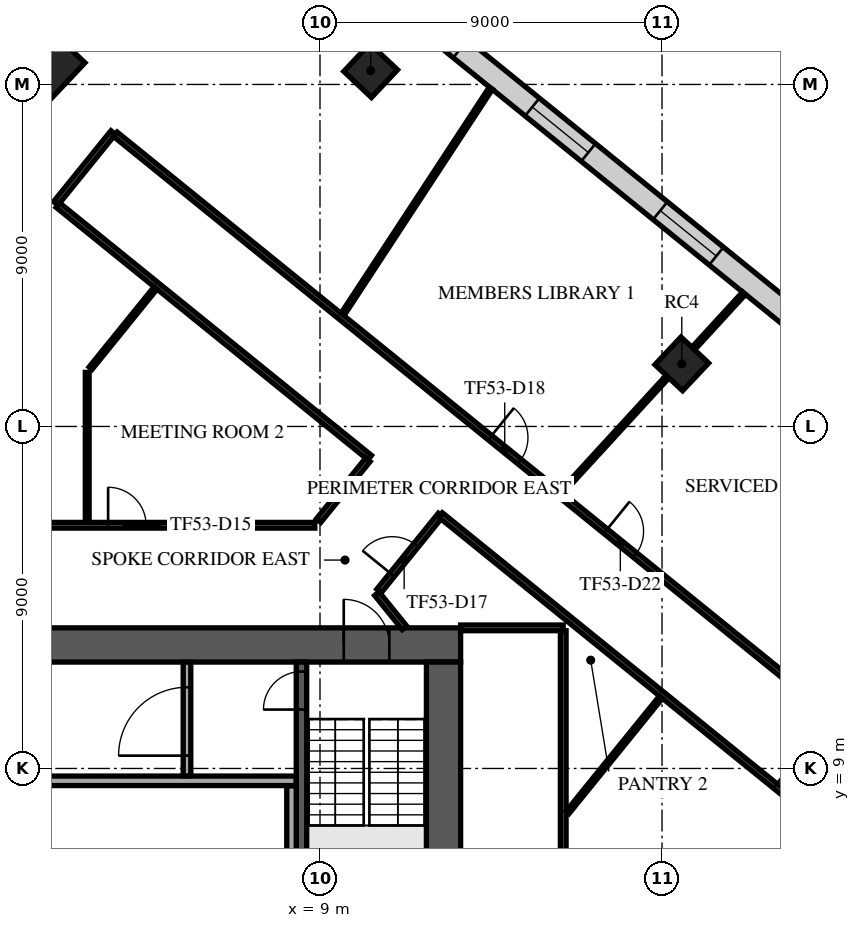
"""IFC4 building model, lengths in metres.
Left out: names, types, materials, properties, quantities, classifications, styles, units other than length and angle.
Written with IfcOpenShell. Run it as: python <this file> out.ifc"""

import sys

from ifc_helpers import new_model, si_unit, direction, frame, frame_2d, origin, origin_2d, place, context, subcontext, project, spatial, rectangle, extrude, element, fill, save


model = new_model("IFC4")
c1 = context("Model", 3, precision=1e-05, world=origin(), true_north=direction((0.0, 1.0)))
c2 = subcontext(c1, "Body", "Model", "MODEL_VIEW")
j1 = project(units=[si_unit("LENGTHUNIT", "METRE"), si_unit("PLANEANGLEUNIT", "RADIAN")], contexts=[c1])
p1 = place(None, origin())
s1 = spatial("IfcSite", under=j1, at=p1, CompositionType="ELEMENT")
p2 = place(p1, origin())
s2 = spatial("IfcBuilding", under=s1, at=p2, CompositionType="ELEMENT")
p3 = place(p2, frame((0.0, 0.0, 225.3)))
s3 = spatial("IfcBuildingStorey", under=s2, at=p3, CompositionType="ELEMENT", Elevation=225.3)
p4 = place(p3, frame((1.685, 27.538, 0.0), z_axis=(0.0, 0.0, 1.0), x_axis=(0.685916152371, 0.727680583715, 0.0)))
e1 = element("IfcColumn", 1, at=p4, inside=s3, PredefinedType="COLUMN", context=c2, shape_type="SweptSolid", body=[
    extrude(rectangle(XDim=1.6, YDim=1.6, at=origin_2d()), origin(), (0.0, 0.0, 1.0), 4.0),
])
for number, where, z_axis, x_axis in (
    (2, (18.52, 19.647, 0.0), (0.0, 0.0, 1.0), (0.686, 0.728, 0.0)),
    (3, (10.333, 27.364, 0.0), (0.0, 0.0, 1.0), (0.686, 0.728, 0.0)),
):
    element("IfcColumn", number, at=place(p3, frame(where, z_axis=z_axis, x_axis=x_axis)), inside=s3, PredefinedType="COLUMN", context=c2, shape_type="SweptSolid", body=[
        extrude(rectangle(XDim=1.0, YDim=1.0, at=origin_2d()), origin(), (0.0, 0.0, 1.0), 4.0),
    ])
p5 = place(p3, frame((-12.7, 12.25, 0.0), z_axis=(0.0, 0.0, 1.0), x_axis=(1.0, 0.0, 0.0)))
e4 = element("IfcWall", 4, at=p5, inside=s3, PredefinedType="SHEAR", context=c2, shape_type="SweptSolid", body=[
    extrude(rectangle(XDim=25.4, YDim=0.9, at=frame_2d((12.7, 0.0))), origin(), (0.0, 0.0, 1.0), 3.62),
])
p6 = place(p5, frame((11.5, 0.0, 0.0)))
e5 = element("IfcOpeningElement", 5, at=p6, cuts=e4, PredefinedType="OPENING", context=c2, shape_type="SweptSolid", body=[
    extrude(rectangle(XDim=2.4, YDim=2.4, at=frame_2d((1.2, 1.2))), frame((0.0, 0.46, 0.0), z_axis=(0.0, -1.0, 0.0), x_axis=(1.0, 0.0, 0.0)), (0.0, 0.0, 1.0), 0.92),
])
p7 = place(p5, frame((22.325, 0.0, 0.0)))
e6 = element("IfcOpeningElement", 6, at=p7, cuts=e4, PredefinedType="OPENING", context=c2, shape_type="SweptSolid", body=[
    extrude(rectangle(XDim=1.2, YDim=2.1, at=frame_2d((0.6, 1.05))), frame((0.0, 0.46, 0.0), z_axis=(0.0, -1.0, 0.0), x_axis=(1.0, 0.0, 0.0)), (0.0, 0.0, 1.0), 0.92),
])
p8 = place(p5, frame((1.3, 0.0, 0.0)))
e7 = element("IfcOpeningElement", 7, at=p8, cuts=e4, PredefinedType="OPENING", context=c2, shape_type="SweptSolid", body=[
    extrude(rectangle(XDim=1.0, YDim=2.1, at=frame_2d((0.5, 1.05))), frame((0.0, 0.46, 0.0), z_axis=(0.0, -1.0, 0.0), x_axis=(1.0, 0.0, 0.0)), (0.0, 0.0, 1.0), 0.92),
])
p9 = place(p3, frame((12.25, -11.8, 0.0), z_axis=(0.0, 0.0, 1.0), x_axis=(0.0, 1.0, 0.0)))
e8 = element("IfcWall", 8, at=p9, inside=s3, PredefinedType="SHEAR", context=c2, shape_type="SweptSolid", body=[
    extrude(rectangle(XDim=23.6, YDim=0.9, at=frame_2d((11.8, 0.0))), origin(), (0.0, 0.0, 1.0), 3.62),
])
p10 = place(p9, frame((10.6, 0.0, 0.0)))
e9 = element("IfcOpeningElement", 9, at=p10, cuts=e8, PredefinedType="OPENING", context=c2, shape_type="SweptSolid", body=[
    extrude(rectangle(XDim=2.4, YDim=2.4, at=frame_2d((1.2, 1.2))), frame((0.0, 0.46, 0.0), z_axis=(0.0, -1.0, 0.0), x_axis=(1.0, 0.0, 0.0)), (0.0, 0.0, 1.0), 0.92),
])
p11 = place(p3, frame((8.512, 4.55, 0.0), z_axis=(0.0, 0.0, 1.0), x_axis=(0.0, 1.0, 0.0)))
e10 = element("IfcWall", 10, at=p11, inside=s3, PredefinedType="SOLIDWALL", context=c2, shape_type="SweptSolid", body=[
    extrude(rectangle(XDim=7.25, YDim=0.275, at=frame_2d((3.625, 0.0))), origin(), (0.0, 0.0, 1.0), 3.62),
])
p12 = place(p11, frame((6.0, 0.0, 0.0)))
e11 = element("IfcOpeningElement", 11, at=p12, cuts=e10, PredefinedType="OPENING", context=c2, shape_type="SweptSolid", body=[
    extrude(rectangle(XDim=1.0, YDim=2.1, at=frame_2d((0.5, 1.05))), frame((0.0, 0.147, 0.0), z_axis=(0.0, -1.0, 0.0), x_axis=(1.0, 0.0, 0.0)), (0.0, 0.0, 1.0), 0.295),
])
p13 = place(p3, frame((8.25, 5.855, 0.0), z_axis=(0.0, 0.0, 1.0), x_axis=(0.0, 1.0, 0.0)))
e12 = element("IfcWall", 12, at=p13, inside=s3, PredefinedType="PARTITIONING", context=c2, shape_type="SweptSolid", body=[
    extrude(rectangle(XDim=2.69, YDim=0.25, at=frame_2d((1.345, 0.0))), origin(), (0.0, 0.0, 1.0), 3.62),
])
p14 = place(p3, frame((-8.35, 8.675, 0.0), z_axis=(0.0, 0.0, 1.0), x_axis=(1.0, 0.0, 0.0)))
e13 = element("IfcWall", 13, at=p14, inside=s3, PredefinedType="PARTITIONING", context=c2, shape_type="SweptSolid", body=[
    extrude(rectangle(XDim=16.72, YDim=0.25, at=frame_2d((8.36, 0.0))), origin(), (0.0, 0.0, 1.0), 3.62),
])
p15 = place(p14, frame((0.975, 0.0, 0.0)))
e14 = element("IfcOpeningElement", 14, at=p15, cuts=e13, PredefinedType="OPENING", context=c2, shape_type="SweptSolid", body=[
    extrude(rectangle(XDim=1.0, YDim=2.1, at=frame_2d((0.5, 1.05))), frame((0.0, 0.135, 0.0), z_axis=(0.0, -1.0, 0.0), x_axis=(1.0, 0.0, 0.0)), (0.0, 0.0, 1.0), 0.27),
])
p16 = place(p14, frame((6.375, 0.0, 0.0)))
e15 = element("IfcOpeningElement", 15, at=p16, cuts=e13, PredefinedType="OPENING", context=c2, shape_type="SweptSolid", body=[
    extrude(rectangle(XDim=1.2, YDim=2.1, at=frame_2d((0.6, 1.05))), frame((0.0, 0.135, 0.0), z_axis=(0.0, -1.0, 0.0), x_axis=(1.0, 0.0, 0.0)), (0.0, 0.0, 1.0), 0.27),
])
p17 = place(p3, frame((5.5, 8.805, 0.0), z_axis=(0.0, 0.0, 1.0), x_axis=(0.0, 1.0, 0.0)))
e16 = element("IfcWall", 16, at=p17, inside=s3, PredefinedType="PARTITIONING", context=c2, shape_type="SweptSolid", body=[
    extrude(rectangle(XDim=2.99, YDim=0.2, at=frame_2d((1.495, 0.0))), origin(), (0.0, 0.0, 1.0), 3.62),
])
p18 = place(p17, frame((0.532, 0.0, 0.0)))
e17 = element("IfcOpeningElement", 17, at=p18, cuts=e16, PredefinedType="OPENING", context=c2, shape_type="SweptSolid", body=[
    extrude(rectangle(XDim=1.8, YDim=2.1, at=frame_2d((0.9, 1.05))), frame((0.0, 0.11, 0.0), z_axis=(0.0, -1.0, 0.0), x_axis=(1.0, 0.0, 0.0)), (0.0, 0.0, 1.0), 0.22),
])
p19 = place(p3, frame((33.845, 10.81, 0.0), z_axis=(0.0, 0.0, 1.0), x_axis=(-0.777145437972, 0.629321037499, 0.0)))
e18 = element("IfcWall", 18, at=p19, inside=s3, PredefinedType="STANDARD", context=c2, shape_type="SweptSolid", body=[
    extrude(rectangle(XDim=39.0, YDim=0.6, at=frame_2d((19.5, 0.0))), origin(), (0.0, 0.0, 1.0), 3.62),
])
p20 = place(p19, frame((1.217, 0.0, 0.9)))
e19 = element("IfcOpeningElement", 19, at=p20, cuts=e18, PredefinedType="OPENING", context=c2, shape_type="SweptSolid", body=[
    extrude(rectangle(XDim=1.9, YDim=2.1, at=frame_2d((0.95, 1.05))), frame((0.0, 0.31, 0.0), z_axis=(0.0, -1.0, 0.0), x_axis=(1.0, 0.0, 0.0)), (0.0, 0.0, 1.0), 0.62),
])
p21 = place(p19, frame((5.55, 0.0, 0.9)))
e20 = element("IfcOpeningElement", 20, at=p21, cuts=e18, PredefinedType="OPENING", context=c2, shape_type="SweptSolid", body=[
    extrude(rectangle(XDim=1.9, YDim=2.1, at=frame_2d((0.95, 1.05))), frame((0.0, 0.31, 0.0), z_axis=(0.0, -1.0, 0.0), x_axis=(1.0, 0.0, 0.0)), (0.0, 0.0, 1.0), 0.62),
])
p22 = place(p19, frame((9.883, 0.0, 0.9)))
e21 = element("IfcOpeningElement", 21, at=p22, cuts=e18, PredefinedType="OPENING", context=c2, shape_type="SweptSolid", body=[
    extrude(rectangle(XDim=1.9, YDim=2.1, at=frame_2d((0.95, 1.05))), frame((0.0, 0.31, 0.0), z_axis=(0.0, -1.0, 0.0), x_axis=(1.0, 0.0, 0.0)), (0.0, 0.0, 1.0), 0.62),
])
p23 = place(p19, frame((14.217, 0.0, 0.9)))
e22 = element("IfcOpeningElement", 22, at=p23, cuts=e18, PredefinedType="OPENING", context=c2, shape_type="SweptSolid", body=[
    extrude(rectangle(XDim=1.9, YDim=2.1, at=frame_2d((0.95, 1.05))), frame((0.0, 0.31, 0.0), z_axis=(0.0, -1.0, 0.0), x_axis=(1.0, 0.0, 0.0)), (0.0, 0.0, 1.0), 0.62),
])
p24 = place(p19, frame((18.55, 0.0, 0.9)))
e23 = element("IfcOpeningElement", 23, at=p24, cuts=e18, PredefinedType="OPENING", context=c2, shape_type="SweptSolid", body=[
    extrude(rectangle(XDim=1.9, YDim=2.1, at=frame_2d((0.95, 1.05))), frame((0.0, 0.31, 0.0), z_axis=(0.0, -1.0, 0.0), x_axis=(1.0, 0.0, 0.0)), (0.0, 0.0, 1.0), 0.62),
])
p25 = place(p19, frame((22.883, 0.0, 0.9)))
e24 = element("IfcOpeningElement", 24, at=p25, cuts=e18, PredefinedType="OPENING", context=c2, shape_type="SweptSolid", body=[
    extrude(rectangle(XDim=1.9, YDim=2.1, at=frame_2d((0.95, 1.05))), frame((0.0, 0.31, 0.0), z_axis=(0.0, -1.0, 0.0), x_axis=(1.0, 0.0, 0.0)), (0.0, 0.0, 1.0), 0.62),
])
p26 = place(p19, frame((27.217, 0.0, 0.9)))
e25 = element("IfcOpeningElement", 25, at=p26, cuts=e18, PredefinedType="OPENING", context=c2, shape_type="SweptSolid", body=[
    extrude(rectangle(XDim=1.9, YDim=2.1, at=frame_2d((0.95, 1.05))), frame((0.0, 0.31, 0.0), z_axis=(0.0, -1.0, 0.0), x_axis=(1.0, 0.0, 0.0)), (0.0, 0.0, 1.0), 0.62),
])
p27 = place(p19, frame((31.55, 0.0, 0.9)))
e26 = element("IfcOpeningElement", 26, at=p27, cuts=e18, PredefinedType="OPENING", context=c2, shape_type="SweptSolid", body=[
    extrude(rectangle(XDim=1.9, YDim=2.1, at=frame_2d((0.95, 1.05))), frame((0.0, 0.31, 0.0), z_axis=(0.0, -1.0, 0.0), x_axis=(1.0, 0.0, 0.0)), (0.0, 0.0, 1.0), 0.62),
])
p28 = place(p19, frame((35.883, 0.0, 0.9)))
e27 = element("IfcOpeningElement", 27, at=p28, cuts=e18, PredefinedType="OPENING", context=c2, shape_type="SweptSolid", body=[
    extrude(rectangle(XDim=1.9, YDim=2.1, at=frame_2d((0.95, 1.05))), frame((0.0, 0.31, 0.0), z_axis=(0.0, -1.0, 0.0), x_axis=(1.0, 0.0, 0.0)), (0.0, 0.0, 1.0), 0.62),
])
p29 = place(p3, frame((-9.196, 15.4, 0.0), z_axis=(0.0, 0.0, 1.0), x_axis=(1.0, 0.0, 0.0)))
e28 = element("IfcWall", 28, at=p29, inside=s3, PredefinedType="PARTITIONING", context=c2, shape_type="SweptSolid", body=[
    extrude(rectangle(XDim=18.06, YDim=0.15, at=frame_2d((9.03, 0.0))), origin(), (0.0, 0.0, 1.0), 3.17),
])
p30 = place(p29, frame((12.621, 0.0, 0.0)))
e29 = element("IfcOpeningElement", 29, at=p30, cuts=e28, PredefinedType="OPENING", context=c2, shape_type="SweptSolid", body=[
    extrude(rectangle(XDim=1.0, YDim=2.1, at=frame_2d((0.5, 1.05))), frame((0.0, 0.085, 0.0), z_axis=(0.0, -1.0, 0.0), x_axis=(1.0, 0.0, 0.0)), (0.0, 0.0, 1.0), 0.17),
])
p31 = place(p3, frame((2.047, 23.869, 0.0), z_axis=(0.0, 0.0, 1.0), x_axis=(0.62925964887, 0.777195145574, 0.0)))
e30 = element("IfcWall", 30, at=p31, inside=s3, PredefinedType="PARTITIONING", context=c2, shape_type="SweptSolid", body=[
    extrude(rectangle(XDim=2.401, YDim=0.15, at=frame_2d((1.201, 0.0))), origin(), (0.0, 0.0, 1.0), 3.17),
])
p32 = place(p3, frame((2.105, 23.822, 0.0), z_axis=(0.0, 0.0, 1.0), x_axis=(0.777178600468, -0.62928008309, 0.0)))
e31 = element("IfcWall", 31, at=p32, inside=s3, PredefinedType="PARTITIONING", context=c2, shape_type="SweptSolid", body=[
    extrude(rectangle(XDim=10.553, YDim=0.15, at=frame_2d((5.277, 0.0))), origin(), (0.0, 0.0, 1.0), 3.17),
])
p33 = place(p3, frame((3.616, 25.688, 0.0), z_axis=(0.0, 0.0, 1.0), x_axis=(0.777137029952, -0.62933142038, 0.0)))
e32 = element("IfcWall", 32, at=p33, inside=s3, PredefinedType="PARTITIONING", context=c2, shape_type="SweptSolid", body=[
    extrude(rectangle(XDim=26.785, YDim=0.15, at=frame_2d((13.393, 0.0))), origin(), (0.0, 0.0, 1.0), 3.17),
])
p34 = place(p33, frame((12.682, 0.0, 0.0)))
e33 = element("IfcOpeningElement", 33, at=p34, cuts=e32, PredefinedType="OPENING", context=c2, shape_type="SweptSolid", body=[
    extrude(rectangle(XDim=1.0, YDim=2.1, at=frame_2d((0.5, 1.05))), frame((0.0, 0.085, 0.0), z_axis=(0.0, -1.0, 0.0), x_axis=(1.0, 0.0, 0.0)), (0.0, 0.0, 1.0), 0.17),
])
p35 = place(p33, frame((16.597, 0.0, 0.0)))
e34 = element("IfcOpeningElement", 34, at=p35, cuts=e32, PredefinedType="OPENING", context=c2, shape_type="SweptSolid", body=[
    extrude(rectangle(XDim=1.0, YDim=2.1, at=frame_2d((0.5, 1.05))), frame((0.0, 0.085, 0.0), z_axis=(0.0, -1.0, 0.0), x_axis=(1.0, 0.0, 0.0)), (0.0, 0.0, 1.0), 0.17),
])
p36 = place(p3, frame((8.963, 15.522, 0.0), z_axis=(0.0, 0.0, 1.0), x_axis=(0.629539094885, 0.776968807618, 0.0)))
e35 = element("IfcWall", 35, at=p36, inside=s3, PredefinedType="PARTITIONING", context=c2, shape_type="SweptSolid", body=[
    extrude(rectangle(XDim=2.06, YDim=0.15, at=frame_2d((1.03, 0.0))), origin(), (0.0, 0.0, 1.0), 3.17),
])
p37 = place(p3, frame((10.495, 13.6, 0.0), z_axis=(0.0, 0.0, 1.0), x_axis=(0.629870659229, -0.776700040326, 0.0)))
e36 = element("IfcWall", 36, at=p37, inside=s3, PredefinedType="PARTITIONING", context=c2, shape_type="SweptSolid", body=[
    extrude(rectangle(XDim=1.159, YDim=0.15, at=frame_2d((0.58, 0.0))), origin(), (0.0, 0.0, 1.0), 3.17),
])
p38 = place(p3, frame((10.553, 13.672, 0.0), z_axis=(0.0, 0.0, 1.0), x_axis=(0.629534094475, 0.776972859174, 0.0)))
e37 = element("IfcWall", 37, at=p38, inside=s3, PredefinedType="PARTITIONING", context=c2, shape_type="SweptSolid", body=[
    extrude(rectangle(XDim=2.572, YDim=0.15, at=frame_2d((1.286, 0.0))), origin(), (0.0, 0.0, 1.0), 3.17),
])
p39 = place(p38, frame((0.55, 0.0, 0.0)))
e38 = element("IfcOpeningElement", 38, at=p39, cuts=e37, PredefinedType="OPENING", context=c2, shape_type="SweptSolid", body=[
    extrude(rectangle(XDim=1.0, YDim=2.1, at=frame_2d((0.5, 1.05))), frame((0.0, 0.085, 0.0), z_axis=(0.0, -1.0, 0.0), x_axis=(1.0, 0.0, 0.0)), (0.0, 0.0, 1.0), 0.17),
])
p40 = place(p3, frame((12.172, 15.671, 0.0), z_axis=(0.0, 0.0, 1.0), x_axis=(0.777123609621, -0.629347992266, 0.0)))
e39 = element("IfcWall", 39, at=p40, inside=s3, PredefinedType="PARTITIONING", context=c2, shape_type="SweptSolid", body=[
    extrude(rectangle(XDim=13.833, YDim=0.15, at=frame_2d((6.917, 0.0))), origin(), (0.0, 0.0, 1.0), 3.17),
])
p41 = place(p40, frame((11.324, 0.0, 0.0)))
e40 = element("IfcOpeningElement", 40, at=p41, cuts=e39, PredefinedType="OPENING", context=c2, shape_type="SweptSolid", body=[
    extrude(rectangle(XDim=1.8, YDim=2.1, at=frame_2d((0.9, 1.05))), frame((0.0, 0.085, 0.0), z_axis=(0.0, -1.0, 0.0), x_axis=(1.0, 0.0, 0.0)), (0.0, 0.0, 1.0), 0.17),
])
p42 = place(p3, frame((12.7, 12.7, 0.0), z_axis=(0.0, 0.0, 1.0), x_axis=(1.0, 0.0, 0.0)))
e41 = element("IfcWall", 41, at=p42, inside=s3, PredefinedType="PARTITIONING", context=c2, shape_type="SweptSolid", body=[
    extrude(rectangle(XDim=2.7, YDim=0.15, at=frame_2d((1.35, 0.0))), origin(), (0.0, 0.0, 1.0), 3.17),
])
p43 = place(p3, frame((15.4, -7.527, 0.0), z_axis=(0.0, 0.0, 1.0), x_axis=(0.0, 1.0, 0.0)))
e42 = element("IfcWall", 42, at=p43, inside=s3, PredefinedType="PARTITIONING", context=c2, shape_type="SweptSolid", body=[
    extrude(rectangle(XDim=20.152, YDim=0.15, at=frame_2d((10.076, 0.0))), origin(), (0.0, 0.0, 1.0), 3.17),
])
p44 = place(p43, frame((11.908, 0.0, 0.0)))
e43 = element("IfcOpeningElement", 43, at=p44, cuts=e42, PredefinedType="OPENING", context=c2, shape_type="SweptSolid", body=[
    extrude(rectangle(XDim=1.0, YDim=2.1, at=frame_2d((0.5, 1.05))), frame((0.0, 0.085, 0.0), z_axis=(0.0, -1.0, 0.0), x_axis=(1.0, 0.0, 0.0)), (0.0, 0.0, 1.0), 0.17),
])
p45 = place(p3, frame((2.875, 15.475, 0.0), z_axis=(0.0, 0.0, 1.0), x_axis=(0.0, 1.0, 0.0)))
e44 = element("IfcWall", 44, at=p45, inside=s3, PredefinedType="PARTITIONING", context=c2, shape_type="SweptSolid", body=[
    extrude(rectangle(XDim=3.949, YDim=0.1, at=frame_2d((1.975, 0.0))), origin(), (0.0, 0.0, 1.0), 3.62),
])
p46 = place(p3, frame((2.964, 19.534, 0.0), z_axis=(0.0, 0.0, 1.0), x_axis=(0.629242163311, 0.777209302513, 0.0)))
e45 = element("IfcWall", 45, at=p46, inside=s3, PredefinedType="PARTITIONING", context=c2, shape_type="SweptSolid", body=[
    extrude(rectangle(XDim=2.718, YDim=0.1, at=frame_2d((1.359, 0.0))), origin(), (0.0, 0.0, 1.0), 3.62),
])
p47 = place(p3, frame((9.594, 20.949, 0.0), z_axis=(0.0, 0.0, 1.0), x_axis=(0.548286159223, 0.836290791295, 0.0)))
e46 = element("IfcWall", 46, at=p47, inside=s3, PredefinedType="PARTITIONING", context=c2, shape_type="SweptSolid", body=[
    extrude(rectangle(XDim=7.115, YDim=0.1, at=frame_2d((3.558, 0.0))), origin(), (0.0, 0.0, 1.0), 2.97),
])
p48 = place(p3, frame((15.363, 16.276, 0.0), z_axis=(0.0, 0.0, 1.0), x_axis=(0.675708525494, 0.737168900982, 0.0)))
e47 = element("IfcWall", 47, at=p48, inside=s3, PredefinedType="PARTITIONING", context=c2, shape_type="SweptSolid", body=[
    extrude(rectangle(XDim=4.119, YDim=0.1, at=frame_2d((2.06, 0.0))), origin(), (0.0, 0.0, 1.0), 3.05),
])
p49 = place(p3, frame((15.514, 7.843, 0.0), z_axis=(0.0, 0.0, 1.0), x_axis=(0.629311514858, 0.777153149172, 0.0)))
e48 = element("IfcWall", 48, at=p49, inside=s3, PredefinedType="PARTITIONING", context=c2, shape_type="SweptSolid", body=[
    extrude(rectangle(XDim=3.906, YDim=0.1, at=frame_2d((1.953, 0.0))), origin(), (0.0, 0.0, 1.0), 3.17),
])
p50 = place(p3, frame((18.822, 20.05, 0.0), z_axis=(0.0, 0.0, 1.0), x_axis=(0.675724628517, 0.737154140201, 0.0)))
e49 = element("IfcWall", 49, at=p50, inside=s3, PredefinedType="PARTITIONING", context=c2, shape_type="SweptSolid", body=[
    extrude(rectangle(XDim=1.975, YDim=0.1, at=frame_2d((0.988, 0.0))), origin(), (0.0, 0.0, 1.0), 3.62),
])
p51 = place(p7, origin())
e50 = element("IfcDoor", 50, at=p51, inside=s3, OperationType="SINGLE_SWING_LEFT", PredefinedType="DOOR", context=c2, shape_type="SweptSolid", body=[
    extrude(rectangle(XDim=1.2, YDim=2.1, at=frame_2d((0.6, 1.05))), frame((0.0, 0.025, 0.0), z_axis=(0.0, -1.0, 0.0), x_axis=(1.0, 0.0, 0.0)), (0.0, 0.0, 1.0), 0.05),
])
fill(e6, e50)
p52 = place(p12, origin())
e51 = element("IfcDoor", 51, at=p52, inside=s3, OperationType="SINGLE_SWING_LEFT", PredefinedType="DOOR", context=c2, shape_type="SweptSolid", body=[
    extrude(rectangle(XDim=1.0, YDim=2.1, at=frame_2d((0.5, 1.05))), frame((0.0, 0.025, 0.0), z_axis=(0.0, -1.0, 0.0), x_axis=(1.0, 0.0, 0.0)), (0.0, 0.0, 1.0), 0.05),
])
fill(e11, e51)
p53 = place(p18, origin())
e52 = element("IfcDoor", 52, at=p53, inside=s3, OperationType="SINGLE_SWING_LEFT", PredefinedType="DOOR", context=c2, shape_type="SweptSolid", body=[
    extrude(rectangle(XDim=1.8, YDim=2.1, at=frame_2d((0.9, 1.05))), frame((0.0, 0.025, 0.0), z_axis=(0.0, -1.0, 0.0), x_axis=(1.0, 0.0, 0.0)), (0.0, 0.0, 1.0), 0.05),
])
fill(e17, e52)
p54 = place(p24, origin())
e53 = element("IfcWindow", 53, at=p54, inside=s3, PartitioningType="SINGLE_PANEL", PredefinedType="WINDOW", context=c2, shape_type="SweptSolid", body=[
    extrude(rectangle(XDim=1.9, YDim=2.1, at=frame_2d((0.95, 1.05))), frame((0.0, 0.03, 0.0), z_axis=(0.0, -1.0, 0.0), x_axis=(1.0, 0.0, 0.0)), (0.0, 0.0, 1.0), 0.06),
])
fill(e23, e53)
p55 = place(p25, origin())
e54 = element("IfcWindow", 54, at=p55, inside=s3, PartitioningType="SINGLE_PANEL", PredefinedType="WINDOW", context=c2, shape_type="SweptSolid", body=[
    extrude(rectangle(XDim=1.9, YDim=2.1, at=frame_2d((0.95, 1.05))), frame((0.0, 0.03, 0.0), z_axis=(0.0, -1.0, 0.0), x_axis=(1.0, 0.0, 0.0)), (0.0, 0.0, 1.0), 0.06),
])
fill(e24, e54)
p56 = place(p30, origin())
e55 = element("IfcDoor", 55, at=p56, inside=s3, OperationType="SINGLE_SWING_LEFT", PredefinedType="DOOR", context=c2, shape_type="SweptSolid", body=[
    extrude(rectangle(XDim=1.0, YDim=2.1, at=frame_2d((0.5, 1.05))), frame((0.0, 0.025, 0.0), z_axis=(0.0, -1.0, 0.0), x_axis=(1.0, 0.0, 0.0)), (0.0, 0.0, 1.0), 0.05),
])
fill(e29, e55)
p57 = place(p39, frame((1.0, 0.0, 0.0), z_axis=(0.0, 0.0, 1.0), x_axis=(-1.0, 0.0, 0.0)))
e56 = element("IfcDoor", 56, at=p57, inside=s3, OperationType="SINGLE_SWING_LEFT", PredefinedType="DOOR", context=c2, shape_type="SweptSolid", body=[
    extrude(rectangle(XDim=1.0, YDim=2.1, at=frame_2d((0.5, 1.05))), frame((0.0, 0.025, 0.0), z_axis=(0.0, -1.0, 0.0), x_axis=(1.0, 0.0, 0.0)), (0.0, 0.0, 1.0), 0.05),
])
fill(e38, e56)
p58 = place(p34, origin())
e57 = element("IfcDoor", 57, at=p58, inside=s3, OperationType="SINGLE_SWING_LEFT", PredefinedType="DOOR", context=c2, shape_type="SweptSolid", body=[
    extrude(rectangle(XDim=1.0, YDim=2.1, at=frame_2d((0.5, 1.05))), frame((0.0, 0.025, 0.0), z_axis=(0.0, -1.0, 0.0), x_axis=(1.0, 0.0, 0.0)), (0.0, 0.0, 1.0), 0.05),
])
fill(e33, e57)
p59 = place(p35, origin())
e58 = element("IfcDoor", 58, at=p59, inside=s3, OperationType="SINGLE_SWING_RIGHT", PredefinedType="DOOR", context=c2, shape_type="SweptSolid", body=[
    extrude(rectangle(XDim=1.0, YDim=2.1, at=frame_2d((0.5, 1.05))), frame((0.0, 0.025, 0.0), z_axis=(0.0, -1.0, 0.0), x_axis=(1.0, 0.0, 0.0)), (0.0, 0.0, 1.0), 0.05),
])
fill(e34, e58)
p60 = place(p41, frame((1.8, 0.0, 0.0), z_axis=(0.0, 0.0, 1.0), x_axis=(-1.0, 0.0, 0.0)))
e59 = element("IfcDoor", 59, at=p60, inside=s3, OperationType="DOUBLE_DOOR_SINGLE_SWING", PredefinedType="DOOR", context=c2, shape_type="SweptSolid", body=[
    extrude(rectangle(XDim=1.8, YDim=2.1, at=frame_2d((0.9, 1.05))), frame((0.0, 0.025, 0.0), z_axis=(0.0, -1.0, 0.0), x_axis=(1.0, 0.0, 0.0)), (0.0, 0.0, 1.0), 0.05),
])
fill(e40, e59)
save(model, sys.argv[1])
